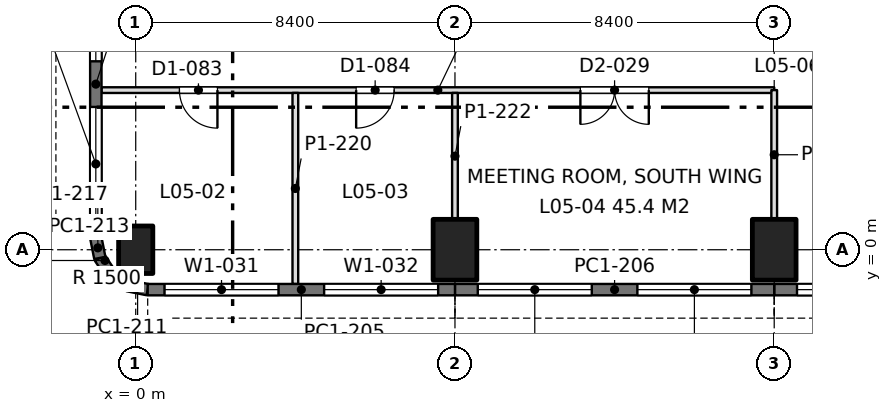
"""IFC4 building model, lengths in metres.
Left out: names, types, materials, properties, quantities, classifications, styles, units other than length and angle.
Written with IfcOpenShell. Run it as: python <this file> out.ifc"""

import sys

from ifc_helpers import new_model, si_unit, direction, frame, frame_2d, origin, origin_with_axes, origin_2d, place, context, subcontext, project, spatial, rectangle, extrude, element, fill, save


model = new_model("IFC4")
c1 = context("Model", 3, precision=1e-05, world=origin(), true_north=direction((0.0, 1.0)))
c2 = subcontext(c1, "Body", "Model", "MODEL_VIEW")
j1 = project(units=[si_unit("LENGTHUNIT", "METRE"), si_unit("PLANEANGLEUNIT", "RADIAN")], contexts=[c1])
p1 = place(None, origin())
s1 = spatial("IfcSite", under=j1, at=p1, CompositionType="ELEMENT")
p2 = place(p1, origin())
s2 = spatial("IfcBuilding", under=s1, at=p2, CompositionType="ELEMENT")
p3 = place(p2, frame((0.0, 0.0, 23.4)))
s3 = spatial("IfcBuildingStorey", under=s2, at=p3, CompositionType="ELEMENT", Elevation=23.4)
p4 = place(p3, origin_with_axes())
e1 = element("IfcColumn", 1, at=p4, inside=s3, PredefinedType="COLUMN", context=c2, shape_type="SweptSolid", body=[
    extrude(rectangle(XDim=0.9, YDim=1.25, at=origin_2d()), origin(), (0.0, 0.0, 1.0), 4.5),
])
for number, where, z_axis, x_axis in (
    (2, (8.4, 0.0, 0.0), (0.0, 0.0, 1.0), (1.0, 0.0, 0.0)),
    (3, (16.8, 0.0, 0.0), (0.0, 0.0, 1.0), (1.0, 0.0, 0.0)),
):
    element("IfcColumn", number, at=place(p3, frame(where, z_axis=z_axis, x_axis=x_axis)), inside=s3, PredefinedType="COLUMN", context=c2, shape_type="SweptSolid", body=[
        extrude(rectangle(XDim=1.15, YDim=1.6, at=origin_2d()), origin(), (0.0, 0.0, 1.0), 4.5),
    ])
p5 = place(p3, frame((25.2, -1.05, 0.0), z_axis=(0.0, 0.0, 1.0), x_axis=(-1.0, 0.0, 0.0)))
e4 = element("IfcWall", 4, at=p5, inside=s3, PredefinedType="SOLIDWALL", context=c2, shape_type="SweptSolid", body=[
    extrude(rectangle(XDim=8.4, YDim=0.3, at=frame_2d((4.2, 0.0))), origin(), (0.0, 0.0, 1.0), 4.34),
])
p6 = place(p5, frame((0.6, 0.0, 0.9)))
e5 = element("IfcOpeningElement", 5, at=p6, cuts=e4, PredefinedType="OPENING", context=c2, shape_type="SweptSolid", body=[
    extrude(rectangle(XDim=3.0, YDim=1.9, at=frame_2d((1.5, 0.95))), frame((0.0, 0.16, 0.0), z_axis=(0.0, -1.0, 0.0), x_axis=(1.0, 0.0, 0.0)), (0.0, 0.0, 1.0), 0.32),
])
p7 = place(p5, frame((4.8, 0.0, 0.9)))
e6 = element("IfcOpeningElement", 6, at=p7, cuts=e4, PredefinedType="OPENING", context=c2, shape_type="SweptSolid", body=[
    extrude(rectangle(XDim=3.0, YDim=1.9, at=frame_2d((1.5, 0.95))), frame((0.0, 0.16, 0.0), z_axis=(0.0, -1.0, 0.0), x_axis=(1.0, 0.0, 0.0)), (0.0, 0.0, 1.0), 0.32),
])
p8 = place(p3, frame((16.8, -1.05, 0.0), z_axis=(0.0, 0.0, 1.0), x_axis=(-1.0, 0.0, 0.0)))
e7 = element("IfcWall", 7, at=p8, inside=s3, PredefinedType="SOLIDWALL", context=c2, shape_type="SweptSolid", body=[
    extrude(rectangle(XDim=8.4, YDim=0.3, at=frame_2d((4.2, 0.0))), origin(), (0.0, 0.0, 1.0), 4.34),
])
p9 = place(p8, frame((0.6, 0.0, 0.9)))
e8 = element("IfcOpeningElement", 8, at=p9, cuts=e7, PredefinedType="OPENING", context=c2, shape_type="SweptSolid", body=[
    extrude(rectangle(XDim=3.0, YDim=1.9, at=frame_2d((1.5, 0.95))), frame((0.0, 0.16, 0.0), z_axis=(0.0, -1.0, 0.0), x_axis=(1.0, 0.0, 0.0)), (0.0, 0.0, 1.0), 0.32),
])
p10 = place(p8, frame((4.8, 0.0, 0.9)))
e9 = element("IfcOpeningElement", 9, at=p10, cuts=e7, PredefinedType="OPENING", context=c2, shape_type="SweptSolid", body=[
    extrude(rectangle(XDim=3.0, YDim=1.9, at=frame_2d((1.5, 0.95))), frame((0.0, 0.16, 0.0), z_axis=(0.0, -1.0, 0.0), x_axis=(1.0, 0.0, 0.0)), (0.0, 0.0, 1.0), 0.32),
])
p11 = place(p3, frame((8.4, -1.05, 0.0), z_axis=(0.0, 0.0, 1.0), x_axis=(-1.0, 0.0, 0.0)))
e10 = element("IfcWall", 10, at=p11, inside=s3, PredefinedType="SOLIDWALL", context=c2, shape_type="SweptSolid", body=[
    extrude(rectangle(XDim=8.085, YDim=0.3, at=frame_2d((4.042, 0.0))), origin(), (0.0, 0.0, 1.0), 4.34),
])
p12 = place(p11, frame((0.443, 0.0, 0.9)))
e11 = element("IfcOpeningElement", 11, at=p12, cuts=e10, PredefinedType="OPENING", context=c2, shape_type="SweptSolid", body=[
    extrude(rectangle(XDim=3.0, YDim=1.9, at=frame_2d((1.5, 0.95))), frame((0.0, 0.16, 0.0), z_axis=(0.0, -1.0, 0.0), x_axis=(1.0, 0.0, 0.0)), (0.0, 0.0, 1.0), 0.32),
])
p13 = place(p11, frame((4.643, 0.0, 0.9)))
e12 = element("IfcOpeningElement", 12, at=p13, cuts=e10, PredefinedType="OPENING", context=c2, shape_type="SweptSolid", body=[
    extrude(rectangle(XDim=3.0, YDim=1.9, at=frame_2d((1.5, 0.95))), frame((0.0, 0.16, 0.0), z_axis=(0.0, -1.0, 0.0), x_axis=(1.0, 0.0, 0.0)), (0.0, 0.0, 1.0), 0.32),
])
p14 = place(p3, frame((0.315, -1.05, 0.0), z_axis=(0.0, 0.0, 1.0), x_axis=(-0.980788534345, 0.195073962632, 0.0)))
e13 = element("IfcWall", 13, at=p14, inside=s3, PredefinedType="SOLIDWALL", context=c2, shape_type="SweptSolid", body=[
    extrude(rectangle(XDim=0.541, YDim=0.3, at=frame_2d((0.271, 0.0))), origin(), (0.0, 0.0, 1.0), 4.34),
])
for number, where, z_axis, x_axis in (
    (14, (-0.216, -0.945, 0.0), (0.0, 0.0, 1.0), (-0.831, 0.556, 0.0)),
    (15, (-0.653, -0.653, 0.0), (0.0, 0.0, 1.0), (-0.556, 0.831, 0.0)),
):
    element("IfcWall", number, at=place(p3, frame(where, z_axis=z_axis, x_axis=x_axis)), inside=s3, PredefinedType="SOLIDWALL", context=c2, shape_type="SweptSolid", body=[
        extrude(rectangle(XDim=0.526, YDim=0.3, at=frame_2d((0.263, 0.0))), origin(), (0.0, 0.0, 1.0), 4.34),
    ])
p15 = place(p3, frame((-0.945, -0.216, 0.0), z_axis=(0.0, 0.0, 1.0), x_axis=(-0.195073962632, 0.980788534345, 0.0)))
e16 = element("IfcWall", 16, at=p15, inside=s3, PredefinedType="SOLIDWALL", context=c2, shape_type="SweptSolid", body=[
    extrude(rectangle(XDim=0.541, YDim=0.3, at=frame_2d((0.271, 0.0))), origin(), (0.0, 0.0, 1.0), 4.34),
])
p16 = place(p3, frame((-1.05, 0.315, 0.0), z_axis=(0.0, 0.0, 1.0), x_axis=(0.0, 1.0, 0.0)))
e17 = element("IfcWall", 17, at=p16, inside=s3, PredefinedType="SOLIDWALL", context=c2, shape_type="SweptSolid", body=[
    extrude(rectangle(XDim=8.085, YDim=0.3, at=frame_2d((4.042, 0.0))), origin(), (0.0, 0.0, 1.0), 4.34),
])
p17 = place(p16, frame((0.443, 0.0, 0.9)))
e18 = element("IfcOpeningElement", 18, at=p17, cuts=e17, PredefinedType="OPENING", context=c2, shape_type="SweptSolid", body=[
    extrude(rectangle(XDim=3.0, YDim=1.9, at=frame_2d((1.5, 0.95))), frame((0.0, 0.16, 0.0), z_axis=(0.0, -1.0, 0.0), x_axis=(1.0, 0.0, 0.0)), (0.0, 0.0, 1.0), 0.32),
])
p18 = place(p16, frame((4.643, 0.0, 0.9)))
e19 = element("IfcOpeningElement", 19, at=p18, cuts=e17, PredefinedType="OPENING", context=c2, shape_type="SweptSolid", body=[
    extrude(rectangle(XDim=3.0, YDim=1.9, at=frame_2d((1.5, 0.95))), frame((0.0, 0.16, 0.0), z_axis=(0.0, -1.0, 0.0), x_axis=(1.0, 0.0, 0.0)), (0.0, 0.0, 1.0), 0.32),
])
p19 = place(p3, frame((-0.902, 4.2, 0.0), z_axis=(0.0, 0.0, 1.0), x_axis=(1.0, 0.0, 0.0)))
e20 = element("IfcWall", 20, at=p19, inside=s3, PredefinedType="PARTITIONING", context=c2, shape_type="SweptSolid", body=[
    extrude(rectangle(XDim=17.702, YDim=0.15, at=frame_2d((8.851, 0.0))), origin(), (0.0, 0.0, 1.0), 3.74),
])
p20 = place(p19, frame((2.052, 0.0, 0.0)))
e21 = element("IfcOpeningElement", 21, at=p20, cuts=e20, PredefinedType="OPENING", context=c2, shape_type="SweptSolid", body=[
    extrude(rectangle(XDim=1.0, YDim=2.2, at=frame_2d((0.5, 1.1))), frame((0.0, 0.085, 0.0), z_axis=(0.0, -1.0, 0.0), x_axis=(1.0, 0.0, 0.0)), (0.0, 0.0, 1.0), 0.17),
])
p21 = place(p19, frame((6.702, 0.0, 0.0)))
e22 = element("IfcOpeningElement", 22, at=p21, cuts=e20, PredefinedType="OPENING", context=c2, shape_type="SweptSolid", body=[
    extrude(rectangle(XDim=1.0, YDim=2.2, at=frame_2d((0.5, 1.1))), frame((0.0, 0.085, 0.0), z_axis=(0.0, -1.0, 0.0), x_axis=(1.0, 0.0, 0.0)), (0.0, 0.0, 1.0), 0.17),
])
p22 = place(p19, frame((12.602, 0.0, 0.0)))
e23 = element("IfcOpeningElement", 23, at=p22, cuts=e20, PredefinedType="OPENING", context=c2, shape_type="SweptSolid", body=[
    extrude(rectangle(XDim=1.8, YDim=2.2, at=frame_2d((0.9, 1.1))), frame((0.0, 0.085, 0.0), z_axis=(0.0, -1.0, 0.0), x_axis=(1.0, 0.0, 0.0)), (0.0, 0.0, 1.0), 0.17),
])
p23 = place(p3, frame((4.2, -0.902, 0.0), z_axis=(0.0, 0.0, 1.0), x_axis=(0.0, 1.0, 0.0)))
e24 = element("IfcWall", 24, at=p23, inside=s3, PredefinedType="PARTITIONING", context=c2, shape_type="SweptSolid", body=[
    extrude(rectangle(XDim=5.028, YDim=0.15, at=frame_2d((2.514, 0.0))), origin(), (0.0, 0.0, 1.0), 3.84),
])
p24 = place(p3, frame((8.4, 0.799, 0.0), z_axis=(0.0, 0.0, 1.0), x_axis=(0.0, 1.0, 0.0)))
e25 = element("IfcWall", 25, at=p24, inside=s3, PredefinedType="PARTITIONING", context=c2, shape_type="SweptSolid", body=[
    extrude(rectangle(XDim=3.327, YDim=0.15, at=frame_2d((1.664, 0.0))), origin(), (0.0, 0.0, 1.0), 3.74),
])
p25 = place(p3, frame((16.8, 0.799, 0.0), z_axis=(0.0, 0.0, 1.0), x_axis=(0.0, 1.0, 0.0)))
e26 = element("IfcWall", 26, at=p25, inside=s3, PredefinedType="PARTITIONING", context=c2, shape_type="SweptSolid", body=[
    extrude(rectangle(XDim=3.401, YDim=0.15, at=frame_2d((1.7, 0.0))), origin(), (0.0, 0.0, 1.0), 3.74),
])
p26 = place(p7, origin())
e27 = element("IfcWindow", 27, at=p26, inside=s3, PartitioningType="SINGLE_PANEL", PredefinedType="WINDOW", context=c2, shape_type="SweptSolid", body=[
    extrude(rectangle(XDim=3.0, YDim=1.9, at=frame_2d((1.5, 0.95))), frame((0.0, 0.03, 0.0), z_axis=(0.0, -1.0, 0.0), x_axis=(1.0, 0.0, 0.0)), (0.0, 0.0, 1.0), 0.06),
])
fill(e6, e27)
p27 = place(p9, origin())
e28 = element("IfcWindow", 28, at=p27, inside=s3, PartitioningType="SINGLE_PANEL", PredefinedType="WINDOW", context=c2, shape_type="SweptSolid", body=[
    extrude(rectangle(XDim=3.0, YDim=1.9, at=frame_2d((1.5, 0.95))), frame((0.0, 0.03, 0.0), z_axis=(0.0, -1.0, 0.0), x_axis=(1.0, 0.0, 0.0)), (0.0, 0.0, 1.0), 0.06),
])
fill(e8, e28)
p28 = place(p10, origin())
e29 = element("IfcWindow", 29, at=p28, inside=s3, PartitioningType="SINGLE_PANEL", PredefinedType="WINDOW", context=c2, shape_type="SweptSolid", body=[
    extrude(rectangle(XDim=3.0, YDim=1.9, at=frame_2d((1.5, 0.95))), frame((0.0, 0.03, 0.0), z_axis=(0.0, -1.0, 0.0), x_axis=(1.0, 0.0, 0.0)), (0.0, 0.0, 1.0), 0.06),
])
fill(e9, e29)
p29 = place(p12, origin())
e30 = element("IfcWindow", 30, at=p29, inside=s3, PartitioningType="SINGLE_PANEL", PredefinedType="WINDOW", context=c2, shape_type="SweptSolid", body=[
    extrude(rectangle(XDim=3.0, YDim=1.9, at=frame_2d((1.5, 0.95))), frame((0.0, 0.03, 0.0), z_axis=(0.0, -1.0, 0.0), x_axis=(1.0, 0.0, 0.0)), (0.0, 0.0, 1.0), 0.06),
])
fill(e11, e30)
p30 = place(p13, origin())
e31 = element("IfcWindow", 31, at=p30, inside=s3, PartitioningType="SINGLE_PANEL", PredefinedType="WINDOW", context=c2, shape_type="SweptSolid", body=[
    extrude(rectangle(XDim=3.0, YDim=1.9, at=frame_2d((1.5, 0.95))), frame((0.0, 0.03, 0.0), z_axis=(0.0, -1.0, 0.0), x_axis=(1.0, 0.0, 0.0)), (0.0, 0.0, 1.0), 0.06),
])
fill(e12, e31)
p31 = place(p17, origin())
e32 = element("IfcWindow", 32, at=p31, inside=s3, PartitioningType="SINGLE_PANEL", PredefinedType="WINDOW", context=c2, shape_type="SweptSolid", body=[
    extrude(rectangle(XDim=3.0, YDim=1.9, at=frame_2d((1.5, 0.95))), frame((0.0, 0.03, 0.0), z_axis=(0.0, -1.0, 0.0), x_axis=(1.0, 0.0, 0.0)), (0.0, 0.0, 1.0), 0.06),
])
fill(e18, e32)
p32 = place(p18, origin())
e33 = element("IfcWindow", 33, at=p32, inside=s3, PartitioningType="SINGLE_PANEL", PredefinedType="WINDOW", context=c2, shape_type="SweptSolid", body=[
    extrude(rectangle(XDim=3.0, YDim=1.9, at=frame_2d((1.5, 0.95))), frame((0.0, 0.03, 0.0), z_axis=(0.0, -1.0, 0.0), x_axis=(1.0, 0.0, 0.0)), (0.0, 0.0, 1.0), 0.06),
])
fill(e19, e33)
p33 = place(p20, frame((1.0, 0.0, 0.0), z_axis=(0.0, 0.0, 1.0), x_axis=(-1.0, 0.0, 0.0)))
e34 = element("IfcDoor", 34, at=p33, inside=s3, OperationType="SINGLE_SWING_LEFT", PredefinedType="DOOR", context=c2, shape_type="SweptSolid", body=[
    extrude(rectangle(XDim=1.0, YDim=2.2, at=frame_2d((0.5, 1.1))), frame((0.0, 0.025, 0.0), z_axis=(0.0, -1.0, 0.0), x_axis=(1.0, 0.0, 0.0)), (0.0, 0.0, 1.0), 0.05),
])
fill(e21, e34)
p34 = place(p21, frame((1.0, 0.0, 0.0), z_axis=(0.0, 0.0, 1.0), x_axis=(-1.0, 0.0, 0.0)))
e35 = element("IfcDoor", 35, at=p34, inside=s3, OperationType="SINGLE_SWING_RIGHT", PredefinedType="DOOR", context=c2, shape_type="SweptSolid", body=[
    extrude(rectangle(XDim=1.0, YDim=2.2, at=frame_2d((0.5, 1.1))), frame((0.0, 0.025, 0.0), z_axis=(0.0, -1.0, 0.0), x_axis=(1.0, 0.0, 0.0)), (0.0, 0.0, 1.0), 0.05),
])
fill(e22, e35)
p35 = place(p22, frame((1.8, 0.0, 0.0), z_axis=(0.0, 0.0, 1.0), x_axis=(-1.0, 0.0, 0.0)))
e36 = element("IfcDoor", 36, at=p35, inside=s3, OperationType="DOUBLE_DOOR_SINGLE_SWING", PredefinedType="DOOR", context=c2, shape_type="SweptSolid", body=[
    extrude(rectangle(XDim=1.8, YDim=2.2, at=frame_2d((0.9, 1.1))), frame((0.0, 0.025, 0.0), z_axis=(0.0, -1.0, 0.0), x_axis=(1.0, 0.0, 0.0)), (0.0, 0.0, 1.0), 0.05),
])
fill(e23, e36)
save(model, sys.argv[1])
